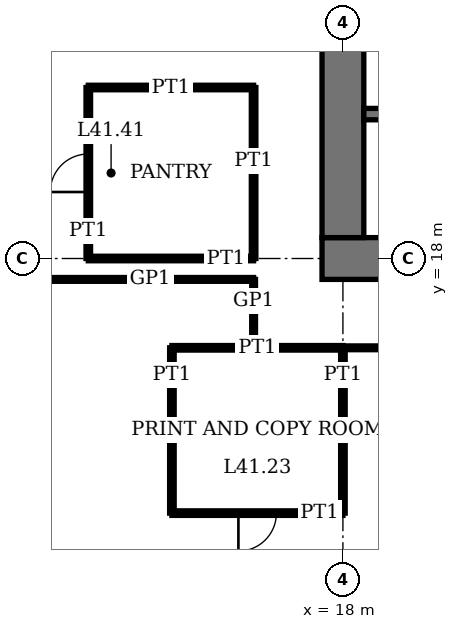
"""IFC4 building model, lengths in metres.
Left out: names, types, materials, properties, quantities, classifications, styles, units other than length and angle.
Written with IfcOpenShell. Run it as: python <this file> out.ifc"""

import sys

from ifc_helpers import new_model, si_unit, direction, frame, frame_2d, origin, place, context, subcontext, project, spatial, rectangle, extrude, element, fill, save


model = new_model("IFC4")
c1 = context("Model", 3, precision=1e-05, world=origin(), true_north=direction((0.0, 1.0)))
c2 = subcontext(c1, "Body", "Model", "MODEL_VIEW")
j1 = project(units=[si_unit("LENGTHUNIT", "METRE"), si_unit("PLANEANGLEUNIT", "RADIAN")], contexts=[c1])
p1 = place(None, origin())
s1 = spatial("IfcSite", under=j1, at=p1, CompositionType="ELEMENT")
p2 = place(p1, origin())
s2 = spatial("IfcBuilding", under=s1, at=p2, CompositionType="ELEMENT")
p3 = place(p2, frame((0.0, 0.0, 170.2)))
s3 = spatial("IfcBuildingStorey", under=s2, at=p3, CompositionType="ELEMENT", Elevation=170.2)
p4 = place(p3, frame((17.45, 18.0, 0.0), z_axis=(0.0, 0.0, 1.0), x_axis=(1.0, 0.0, 0.0)))
e1 = element("IfcWall", 1, at=p4, inside=s3, PredefinedType="SHEAR", context=c2, shape_type="SweptSolid", body=[
    extrude(rectangle(XDim=28.1, YDim=1.1, at=frame_2d((14.05, 0.0))), origin(), (0.0, 0.0, 1.0), 4.0),
])
p5 = place(p4, frame((11.55, 0.0, 0.0)))
e2 = element("IfcOpeningElement", 2, at=p5, cuts=e1, PredefinedType="OPENING", context=c2, shape_type="SweptSolid", body=[
    extrude(rectangle(XDim=1.0, YDim=2.4, at=frame_2d((0.5, 1.2))), frame((0.0, 0.56, 0.0), z_axis=(0.0, -1.0, 0.0), x_axis=(1.0, 0.0, 0.0)), (0.0, 0.0, 1.0), 1.12),
])
p6 = place(p4, frame((16.55, 0.0, 0.0)))
e3 = element("IfcOpeningElement", 3, at=p6, cuts=e1, PredefinedType="OPENING", context=c2, shape_type="SweptSolid", body=[
    extrude(rectangle(XDim=1.0, YDim=2.4, at=frame_2d((0.5, 1.2))), frame((0.0, 0.56, 0.0), z_axis=(0.0, -1.0, 0.0), x_axis=(1.0, 0.0, 0.0)), (0.0, 0.0, 1.0), 1.12),
])
p7 = place(p4, frame((20.0, 0.0, 0.0)))
e4 = element("IfcOpeningElement", 4, at=p7, cuts=e1, PredefinedType="OPENING", context=c2, shape_type="SweptSolid", body=[
    extrude(rectangle(XDim=1.1, YDim=2.4, at=frame_2d((0.55, 1.2))), frame((0.0, 0.56, 0.0), z_axis=(0.0, -1.0, 0.0), x_axis=(1.0, 0.0, 0.0)), (0.0, 0.0, 1.0), 1.12),
])
p8 = place(p4, frame((24.05, 0.0, 0.0)))
e5 = element("IfcOpeningElement", 5, at=p8, cuts=e1, PredefinedType="OPENING", context=c2, shape_type="SweptSolid", body=[
    extrude(rectangle(XDim=1.0, YDim=2.4, at=frame_2d((0.5, 1.2))), frame((0.0, 0.56, 0.0), z_axis=(0.0, -1.0, 0.0), x_axis=(1.0, 0.0, 0.0)), (0.0, 0.0, 1.0), 1.12),
])
p9 = place(p3, frame((18.0, 35.45, 0.0), z_axis=(0.0, 0.0, 1.0), x_axis=(0.0, -1.0, 0.0)))
e6 = element("IfcWall", 6, at=p9, inside=s3, PredefinedType="SHEAR", context=c2, shape_type="SweptSolid", body=[
    extrude(rectangle(XDim=16.9, YDim=1.1, at=frame_2d((8.45, 0.0))), origin(), (0.0, 0.0, 1.0), 4.0),
])
p10 = place(p9, frame((8.45, 0.0, 0.0)))
e7 = element("IfcOpeningElement", 7, at=p10, cuts=e6, PredefinedType="OPENING", context=c2, shape_type="SweptSolid", body=[
    extrude(rectangle(XDim=1.8, YDim=2.4, at=frame_2d((0.9, 1.2))), frame((0.0, 0.56, 0.0), z_axis=(0.0, -1.0, 0.0), x_axis=(1.0, 0.0, 0.0)), (0.0, 0.0, 1.0), 1.12),
])
p11 = place(p3, frame((18.55, 21.8, 0.0), z_axis=(0.0, 0.0, 1.0), x_axis=(1.0, 0.0, 0.0)))
e8 = element("IfcWall", 8, at=p11, inside=s3, PredefinedType="SHEAR", context=c2, shape_type="SweptSolid", body=[
    extrude(rectangle(XDim=8.3, YDim=0.3, at=frame_2d((4.15, 0.0))), origin(), (0.0, 0.0, 1.0), 4.0),
])
p12 = place(p11, frame((6.85, 0.0, 0.0)))
e9 = element("IfcOpeningElement", 9, at=p12, cuts=e8, PredefinedType="OPENING", context=c2, shape_type="SweptSolid", body=[
    extrude(rectangle(XDim=1.0, YDim=2.4, at=frame_2d((0.5, 1.2))), frame((0.0, 0.16, 0.0), z_axis=(0.0, -1.0, 0.0), x_axis=(1.0, 0.0, 0.0)), (0.0, 0.0, 1.0), 0.32),
])
p13 = place(p3, frame((13.5, 11.3, 0.0), z_axis=(0.0, 0.0, 1.0), x_axis=(1.0, 0.0, 0.0)))
e10 = element("IfcWall", 10, at=p13, inside=s3, PredefinedType="PARTITIONING", context=c2, shape_type="SweptSolid", body=[
    extrude(rectangle(XDim=4.5, YDim=0.12, at=frame_2d((2.25, 0.0))), origin(), (0.0, 0.0, 1.0), 3.75),
])
p14 = place(p13, frame((1.75, 0.0, 0.0)))
e11 = element("IfcOpeningElement", 11, at=p14, cuts=e10, PredefinedType="OPENING", context=c2, shape_type="SweptSolid", body=[
    extrude(rectangle(XDim=1.0, YDim=2.4, at=frame_2d((0.5, 1.2))), frame((0.0, 0.07, 0.0), z_axis=(0.0, -1.0, 0.0), x_axis=(1.0, 0.0, 0.0)), (0.0, 0.0, 1.0), 0.14),
])
p15 = place(p3, frame((13.5, 15.65, 0.0), z_axis=(0.0, 0.0, 1.0), x_axis=(1.0, 0.0, 0.0)))
e12 = element("IfcWall", 12, at=p15, inside=s3, PredefinedType="PARTITIONING", context=c2, shape_type="SweptSolid", body=[
    extrude(rectangle(XDim=4.5, YDim=0.12, at=frame_2d((2.25, 0.0))), origin(), (0.0, 0.0, 1.0), 3.75),
])
p16 = place(p3, frame((18.0, 15.65, 0.0), z_axis=(0.0, 0.0, 1.0), x_axis=(1.0, 0.0, 0.0)))
e13 = element("IfcWall", 13, at=p16, inside=s3, PredefinedType="PARTITIONING", context=c2, shape_type="SweptSolid", body=[
    extrude(rectangle(XDim=13.5, YDim=0.1, at=frame_2d((6.75, 0.0))), origin(), (0.0, 0.0, 1.0), 3.75),
])
p17 = place(p16, frame((6.25, 0.0, 0.0)))
e14 = element("IfcOpeningElement", 14, at=p17, cuts=e13, PredefinedType="OPENING", context=c2, shape_type="SweptSolid", body=[
    extrude(rectangle(XDim=1.0, YDim=2.4, at=frame_2d((0.5, 1.2))), frame((0.0, 0.06, 0.0), z_axis=(0.0, -1.0, 0.0), x_axis=(1.0, 0.0, 0.0)), (0.0, 0.0, 1.0), 0.12),
])
p18 = place(p3, frame((9.8, 17.45, 0.0), z_axis=(0.0, 0.0, 1.0), x_axis=(1.0, 0.0, 0.0)))
e15 = element("IfcWall", 15, at=p18, inside=s3, PredefinedType="PARTITIONING", context=c2, shape_type="SweptSolid", body=[
    extrude(rectangle(XDim=5.85, YDim=0.1, at=frame_2d((2.925, 0.0))), origin(), (0.0, 0.0, 1.0), 3.75),
])
p19 = place(p3, frame((11.3, 18.0, 0.0), z_axis=(0.0, 0.0, 1.0), x_axis=(1.0, 0.0, 0.0)))
e16 = element("IfcWall", 16, at=p19, inside=s3, PredefinedType="PARTITIONING", context=c2, shape_type="SweptSolid", body=[
    extrude(rectangle(XDim=4.35, YDim=0.12, at=frame_2d((2.175, 0.0))), origin(), (0.0, 0.0, 1.0), 3.05),
])
p20 = place(p3, frame((11.3, 22.5, 0.0), z_axis=(0.0, 0.0, 1.0), x_axis=(1.0, 0.0, 0.0)))
e17 = element("IfcWall", 17, at=p20, inside=s3, PredefinedType="PARTITIONING", context=c2, shape_type="SweptSolid", body=[
    extrude(rectangle(XDim=4.35, YDim=0.12, at=frame_2d((2.175, 0.0))), origin(), (0.0, 0.0, 1.0), 3.1),
])
p21 = place(p3, frame((11.3, 18.0, 0.0), z_axis=(0.0, 0.0, 1.0), x_axis=(0.0, 1.0, 0.0)))
e18 = element("IfcWall", 18, at=p21, inside=s3, PredefinedType="PARTITIONING", context=c2, shape_type="SweptSolid", body=[
    extrude(rectangle(XDim=4.5, YDim=0.12, at=frame_2d((2.25, 0.0))), origin(), (0.0, 0.0, 1.0), 3.75),
])
p22 = place(p21, frame((1.75, 0.0, 0.0)))
e19 = element("IfcOpeningElement", 19, at=p22, cuts=e18, PredefinedType="OPENING", context=c2, shape_type="SweptSolid", body=[
    extrude(rectangle(XDim=1.0, YDim=2.4, at=frame_2d((0.5, 1.2))), frame((0.0, 0.07, 0.0), z_axis=(0.0, -1.0, 0.0), x_axis=(1.0, 0.0, 0.0)), (0.0, 0.0, 1.0), 0.14),
])
p23 = place(p3, frame((13.5, 11.3, 0.0), z_axis=(0.0, 0.0, 1.0), x_axis=(0.0, 1.0, 0.0)))
e20 = element("IfcWall", 20, at=p23, inside=s3, PredefinedType="PARTITIONING", context=c2, shape_type="SweptSolid", body=[
    extrude(rectangle(XDim=4.35, YDim=0.12, at=frame_2d((2.175, 0.0))), origin(), (0.0, 0.0, 1.0), 3.75),
])
p24 = place(p3, frame((15.65, 18.0, 0.0), z_axis=(0.0, 0.0, 1.0), x_axis=(0.0, 1.0, 0.0)))
e21 = element("IfcWall", 21, at=p24, inside=s3, PredefinedType="PARTITIONING", context=c2, shape_type="SweptSolid", body=[
    extrude(rectangle(XDim=4.5, YDim=0.12, at=frame_2d((2.25, 0.0))), origin(), (0.0, 0.0, 1.0), 3.75),
])
p25 = place(p3, frame((15.65, 15.65, 0.0), z_axis=(0.0, 0.0, 1.0), x_axis=(0.0, 1.0, 0.0)))
e22 = element("IfcWall", 22, at=p25, inside=s3, PredefinedType="PARTITIONING", context=c2, shape_type="SweptSolid", body=[
    extrude(rectangle(XDim=1.8, YDim=0.1, at=frame_2d((0.9, 0.0))), origin(), (0.0, 0.0, 1.0), 3.75),
])
p26 = place(p3, frame((18.0, 11.3, 0.0), z_axis=(0.0, 0.0, 1.0), x_axis=(0.0, 1.0, 0.0)))
e23 = element("IfcWall", 23, at=p26, inside=s3, PredefinedType="PARTITIONING", context=c2, shape_type="SweptSolid", body=[
    extrude(rectangle(XDim=4.35, YDim=0.12, at=frame_2d((2.175, 0.0))), origin(), (0.0, 0.0, 1.0), 3.05),
])
p27 = place(p14, origin())
e24 = element("IfcDoor", 24, at=p27, inside=s3, OperationType="SINGLE_SWING_LEFT", PredefinedType="DOOR", context=c2, shape_type="SweptSolid", body=[
    extrude(rectangle(XDim=1.0, YDim=2.4, at=frame_2d((0.5, 1.2))), frame((0.0, 0.025, 0.0), z_axis=(0.0, -1.0, 0.0), x_axis=(1.0, 0.0, 0.0)), (0.0, 0.0, 1.0), 0.05),
])
fill(e11, e24)
p28 = place(p22, origin())
e25 = element("IfcDoor", 25, at=p28, inside=s3, OperationType="SINGLE_SWING_RIGHT", PredefinedType="DOOR", context=c2, shape_type="SweptSolid", body=[
    extrude(rectangle(XDim=1.0, YDim=2.4, at=frame_2d((0.5, 1.2))), frame((0.0, 0.025, 0.0), z_axis=(0.0, -1.0, 0.0), x_axis=(1.0, 0.0, 0.0)), (0.0, 0.0, 1.0), 0.05),
])
fill(e19, e25)
save(model, sys.argv[1])
